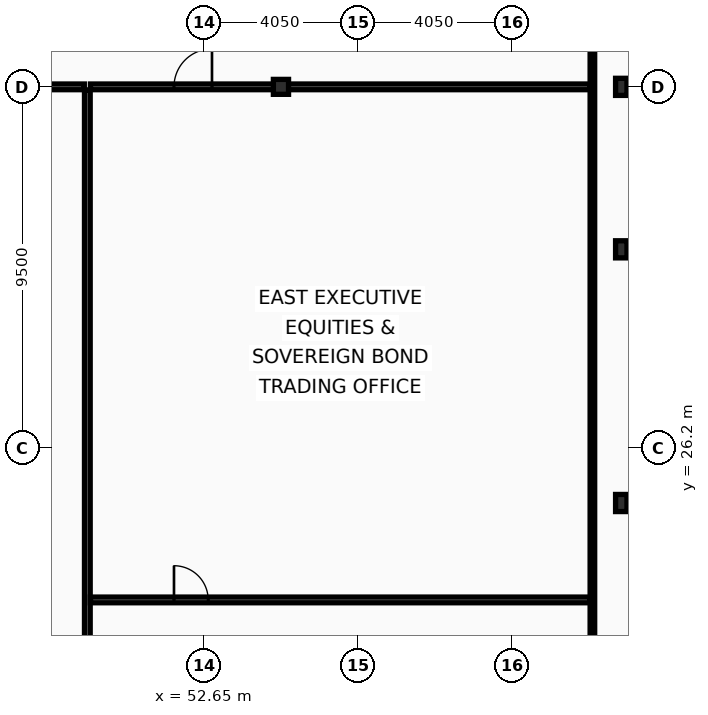
"""IFC4 building model, lengths in metres.
Left out: names, types, materials, properties, quantities, classifications, styles, units other than length and angle.
Written with IfcOpenShell. Run it as: python <this file> out.ifc"""

import sys

from ifc_helpers import new_model, si_unit, direction, frame, frame_2d, origin, origin_2d, place, context, subcontext, project, spatial, rectangle, i_section, extrude, element, fill, save


model = new_model("IFC4")
c1 = context("Model", 3, precision=1e-05, world=origin(), true_north=direction((0.0, 1.0)))
c2 = subcontext(c1, "Body", "Model", "MODEL_VIEW")
j1 = project(units=[si_unit("LENGTHUNIT", "METRE"), si_unit("PLANEANGLEUNIT", "RADIAN")], contexts=[c1])
p1 = place(None, origin())
s1 = spatial("IfcSite", under=j1, at=p1, CompositionType="ELEMENT")
p2 = place(p1, origin())
s2 = spatial("IfcBuilding", under=s1, at=p2, CompositionType="ELEMENT")
p3 = place(p2, frame((0.0, 0.0, 284.2)))
s3 = spatial("IfcBuildingStorey", under=s2, at=p3, CompositionType="ELEMENT", Elevation=284.2)
for number, where, z_axis, x_axis in (
    (1, (63.63, 24.75, 0.0), (0.0, 0.0, 1.0), (1.0, 0.0, 0.0)),
    (2, (63.63, 31.425, 0.0), (0.0, 0.0, 1.0), (1.0, 0.0, 0.0)),
    (3, (63.63, 35.7, 0.0), (0.0, 0.0, 1.0), (1.0, 0.0, 0.0)),
):
    element("IfcColumn", number, at=place(p3, frame(where, z_axis=z_axis, x_axis=x_axis)), inside=s3, PredefinedType="COLUMN", context=c2, shape_type="SweptSolid", body=[
        extrude(i_section(OverallWidth=0.3, OverallDepth=0.45, WebThickness=0.014, FlangeThickness=0.026, at=origin_2d()), origin(), (0.0, 0.0, 1.0), 3.6),
    ])
p4 = place(p3, frame((54.675, 35.7, 0.0), z_axis=(0.0, 0.0, 1.0), x_axis=(1.0, 0.0, 0.0)))
e4 = element("IfcColumn", 4, at=p4, inside=s3, PredefinedType="COLUMN", context=c2, shape_type="SweptSolid", body=[
    extrude(i_section(OverallWidth=0.399, OverallDepth=0.393, WebThickness=0.023, FlangeThickness=0.037, at=origin_2d()), origin(), (0.0, 0.0, 1.0), 3.6),
])
p5 = place(p3, frame((49.58, 10.665, 0.0), z_axis=(0.0, 0.0, 1.0), x_axis=(0.0, 1.0, 0.0)))
e5 = element("IfcWall", 5, at=p5, inside=s3, PredefinedType="PARTITIONING", context=c2, shape_type="SweptSolid", body=[
    extrude(rectangle(XDim=24.955, YDim=0.15, at=frame_2d((12.478, 0.0))), origin(), (0.0, 0.0, 1.0), 3.03),
])
p6 = place(p5, frame((3.2, 0.0, 0.0)))
e6 = element("IfcOpeningElement", 6, at=p6, cuts=e5, PredefinedType="OPENING", context=c2, shape_type="SweptSolid", body=[
    extrude(rectangle(XDim=1.1, YDim=2.1, at=frame_2d((0.55, 1.05))), frame((0.0, 0.085, 0.0), z_axis=(0.0, -1.0, 0.0), x_axis=(1.0, 0.0, 0.0)), (0.0, 0.0, 1.0), 0.17),
])
p7 = place(p3, frame((24.48, 35.7, 0.0), z_axis=(0.0, 0.0, 1.0), x_axis=(1.0, 0.0, 0.0)))
e7 = element("IfcWall", 7, at=p7, inside=s3, PredefinedType="PARTITIONING", context=c2, shape_type="SweptSolid", body=[
    extrude(rectangle(XDim=25.02, YDim=0.15, at=frame_2d((12.51, 0.0))), origin(), (0.0, 0.0, 1.0), 2.78),
])
p8 = place(p3, frame((49.66, 35.7, 0.0), z_axis=(0.0, 0.0, 1.0), x_axis=(1.0, 0.0, 0.0)))
e8 = element("IfcWall", 8, at=p8, inside=s3, PredefinedType="PARTITIONING", context=c2, shape_type="SweptSolid", body=[
    extrude(rectangle(XDim=13.145, YDim=0.15, at=frame_2d((6.573, 0.0))), origin(), (0.0, 0.0, 1.0), 2.78),
])
p9 = place(p8, frame((2.2, 0.0, 0.0)))
e9 = element("IfcOpeningElement", 9, at=p9, cuts=e8, PredefinedType="OPENING", context=c2, shape_type="SweptSolid", body=[
    extrude(rectangle(XDim=1.0, YDim=2.05, at=frame_2d((0.5, 1.025))), frame((0.0, 0.085, 0.0), z_axis=(0.0, -1.0, 0.0), x_axis=(1.0, 0.0, 0.0)), (0.0, 0.0, 1.0), 0.17),
])
p10 = place(p3, frame((49.66, 22.2, 0.0), z_axis=(0.0, 0.0, 1.0), x_axis=(1.0, 0.0, 0.0)))
e10 = element("IfcWall", 10, at=p10, inside=s3, PredefinedType="PARTITIONING", context=c2, shape_type="SweptSolid", body=[
    extrude(rectangle(XDim=13.145, YDim=0.15, at=frame_2d((6.573, 0.0))), origin(), (0.0, 0.0, 1.0), 2.78),
])
p11 = place(p10, frame((2.2, 0.0, 0.0)))
e11 = element("IfcOpeningElement", 11, at=p11, cuts=e10, PredefinedType="OPENING", context=c2, shape_type="SweptSolid", body=[
    extrude(rectangle(XDim=0.9, YDim=2.05, at=frame_2d((0.45, 1.025))), frame((0.0, 0.085, 0.0), z_axis=(0.0, -1.0, 0.0), x_axis=(1.0, 0.0, 0.0)), (0.0, 0.0, 1.0), 0.17),
])
p12 = place(p3, frame((62.87, 10.665, 0.0), z_axis=(0.0, 0.0, 1.0), x_axis=(0.0, 1.0, 0.0)))
e12 = element("IfcWall", 12, at=p12, inside=s3, PredefinedType="PARTITIONING", context=c2, shape_type="SweptSolid", body=[
    extrude(rectangle(XDim=42.11, YDim=0.12, at=frame_2d((21.055, 0.0))), origin(), (0.0, 0.0, 1.0), 2.78),
])
p13 = place(p9, origin())
e13 = element("IfcDoor", 13, at=p13, inside=s3, OperationType="SINGLE_SWING_RIGHT", PredefinedType="DOOR", context=c2, shape_type="SweptSolid", body=[
    extrude(rectangle(XDim=1.0, YDim=2.05, at=frame_2d((0.5, 1.025))), frame((0.0, 0.025, 0.0), z_axis=(0.0, -1.0, 0.0), x_axis=(1.0, 0.0, 0.0)), (0.0, 0.0, 1.0), 0.05),
])
fill(e9, e13)
p14 = place(p11, origin())
e14 = element("IfcDoor", 14, at=p14, inside=s3, OperationType="SINGLE_SWING_LEFT", PredefinedType="DOOR", context=c2, shape_type="SweptSolid", body=[
    extrude(rectangle(XDim=0.9, YDim=2.05, at=frame_2d((0.45, 1.025))), frame((0.0, 0.025, 0.0), z_axis=(0.0, -1.0, 0.0), x_axis=(1.0, 0.0, 0.0)), (0.0, 0.0, 1.0), 0.05),
])
fill(e11, e14)
save(model, sys.argv[1])
